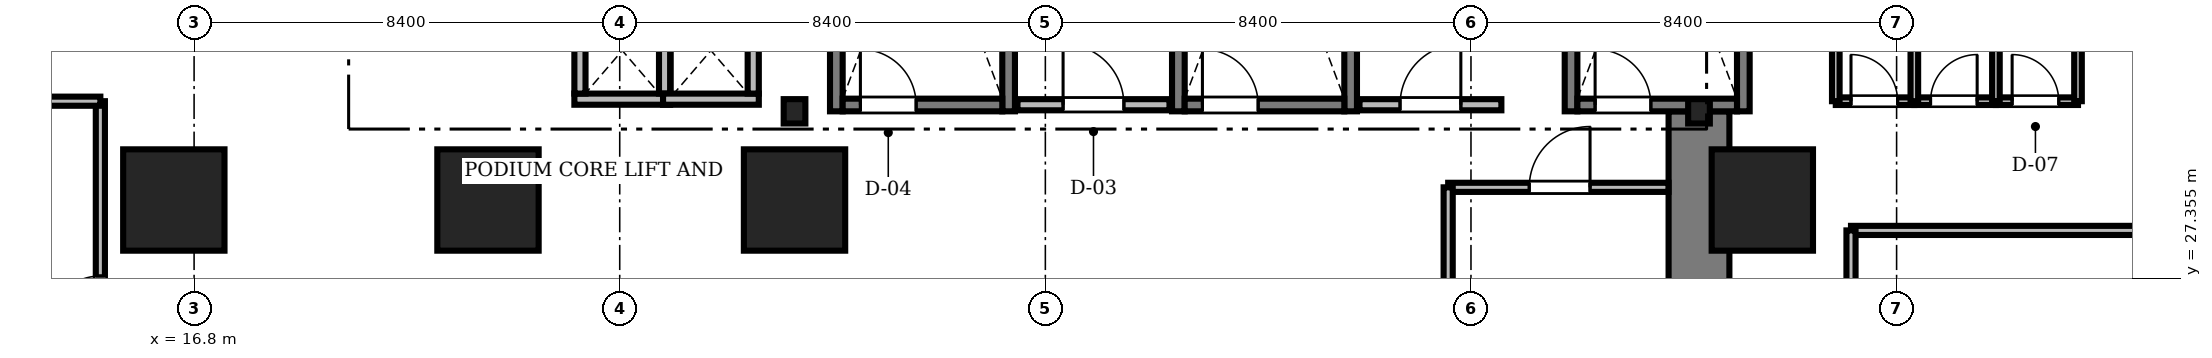
"""IFC4 building model, lengths in metres.
Left out: names, types, materials, properties, quantities, classifications, styles, units other than length and angle.
Written with IfcOpenShell. Run it as: python <this file> out.ifc"""

import sys

from ifc_helpers import new_model, si_unit, direction, frame, frame_2d, origin, origin_2d, place, context, subcontext, project, spatial, rectangle, i_section, extrude, source, transform, mapped, element, fill, save


model = new_model("IFC4")
c1 = context("Model", 3, precision=1e-05, world=origin(), true_north=direction((0.0, 1.0)))
c2 = subcontext(c1, "Body", "Model", "MODEL_VIEW")
j1 = project(units=[si_unit("LENGTHUNIT", "METRE"), si_unit("PLANEANGLEUNIT", "RADIAN")], contexts=[c1])
p1 = place(None, origin())
s1 = spatial("IfcSite", under=j1, at=p1, CompositionType="ELEMENT")
p2 = place(p1, origin())
s2 = spatial("IfcBuilding", under=s1, at=p2, CompositionType="ELEMENT")
p3 = place(p2, frame((0.0, 0.0, 11.4)))
s3 = spatial("IfcBuildingStorey", under=s2, at=p3, CompositionType="ELEMENT", Elevation=11.4)
m1 = source(origin(), c2, "Body", "SweptSolid", [
    extrude(rectangle(XDim=13.15, YDim=1.2, at=frame_2d((6.575, 0.0))), origin(), (0.0, 0.0, 1.0), 5.2),
])
p4 = place(p3, frame((46.5, 17.5, 0.0), z_axis=(0.0, 0.0, 1.0), x_axis=(0.0, 1.0, 0.0)))
e1 = element("IfcWall", 1, at=p4, inside=s3, PredefinedType="SHEAR", context=c2, shape_type="MappedRepresentation", body=[
    mapped(m1, transform((0.0, 0.0, 0.0), scale=1.0)),
])
m2 = source(origin(), c2, "Body", "SweptSolid", [
    extrude(i_section(OverallWidth=0.428, OverallDepth=0.481, WebThickness=0.04, FlangeThickness=0.063, FilletRadius=0.015, at=origin_2d()), origin(), (0.0, 0.0, 1.0), 5.2),
])
for number, where, z_axis, x_axis in (
    (2, (28.65, 30.65, 0.0), (0.0, 0.0, 1.0), (1.0, 0.0, 0.0)),
    (3, (46.5, 30.65, 0.0), (0.0, 0.0, 1.0), (1.0, 0.0, 0.0)),
):
    element("IfcColumn", number, at=place(p3, frame(where, z_axis=z_axis, x_axis=x_axis)), inside=s3, PredefinedType="COLUMN", context=c2, shape_type="MappedRepresentation", body=[
        mapped(m2, transform((0.0, 0.0, 0.0), scale=1.0)),
    ])
m3 = source(origin(), c2, "Body", "SweptSolid", [
    extrude(rectangle(XDim=2.0, YDim=2.0, at=origin_2d()), origin(), (0.0, 0.0, 1.0), 5.2),
])
for number, where, z_axis, x_axis in (
    (4, (16.4, 28.9, 0.0), (0.0, 0.0, 1.0), (1.0, 0.0, 0.0)),
    (5, (22.6, 28.9, 0.0), (0.0, 0.0, 1.0), (1.0, 0.0, 0.0)),
    (6, (28.65, 28.9, 0.0), (0.0, 0.0, 1.0), (1.0, 0.0, 0.0)),
    (7, (47.75, 28.9, 0.0), (0.0, 0.0, 1.0), (1.0, 0.0, 0.0)),
):
    element("IfcColumn", number, at=place(p3, frame(where, z_axis=z_axis, x_axis=x_axis)), inside=s3, PredefinedType="COLUMN", context=c2, shape_type="MappedRepresentation", body=[
        mapped(m3, transform((0.0, 0.0, 0.0), scale=1.0)),
    ])
m4 = source(origin(), c2, "Body", "SweptSolid", [
    extrude(rectangle(XDim=9.05, YDim=0.25, at=frame_2d((4.525, 0.0))), origin(), (0.0, 0.0, 1.0), 5.4),
])
for number, where, z_axis, x_axis in (
    (8, (29.475, 30.65, 0.0), (0.0, 0.0, 1.0), (0.0, 1.0, 0.0)),
    (9, (32.875, 30.65, 0.0), (0.0, 0.0, 1.0), (0.0, 1.0, 0.0)),
):
    element("IfcWall", number, at=place(p3, frame(where, z_axis=z_axis, x_axis=x_axis)), inside=s3, PredefinedType="SOLIDWALL", context=c2, shape_type="MappedRepresentation", body=[
        mapped(m4, transform((0.0, 0.0, 0.0), scale=1.0)),
    ])
m5 = source(origin(), c2, "Body", "SweptSolid", [
    extrude(rectangle(XDim=3.15, YDim=0.25, at=frame_2d((1.575, 0.0))), origin(), (0.0, 0.0, 1.0), 5.4),
])
p5 = place(p3, frame((29.6, 30.775, 0.0), z_axis=(0.0, 0.0, 1.0), x_axis=(1.0, 0.0, 0.0)))
e10 = element("IfcWall", 10, at=p5, inside=s3, PredefinedType="SOLIDWALL", context=c2, shape_type="MappedRepresentation", body=[
    mapped(m5, transform((0.0, 0.0, 0.0), scale=1.0)),
])
m6 = source(origin(), c2, "Body", "SweptSolid", [
    extrude(rectangle(XDim=1.1, YDim=2.2, at=frame_2d((0.55, 1.1))), frame((0.0, 0.135, 0.0), z_axis=(0.0, -1.0, 0.0), x_axis=(1.0, 0.0, 0.0)), (0.0, 0.0, 1.0), 0.27),
])
p6 = place(p5, frame((0.35, 0.0, 0.0)))
e11 = element("IfcOpeningElement", 11, at=p6, cuts=e10, PredefinedType="OPENING", context=c2, shape_type="MappedRepresentation", body=[
    mapped(m6, transform((0.0, 0.0, 0.0), scale=1.0)),
])
for number, where, z_axis, x_axis in (
    (12, (36.225, 30.65, 0.0), (0.0, 0.0, 1.0), (0.0, 1.0, 0.0)),
    (13, (39.625, 30.65, 0.0), (0.0, 0.0, 1.0), (0.0, 1.0, 0.0)),
):
    element("IfcWall", number, at=place(p3, frame(where, z_axis=z_axis, x_axis=x_axis)), inside=s3, PredefinedType="SOLIDWALL", context=c2, shape_type="MappedRepresentation", body=[
        mapped(m4, transform((0.0, 0.0, 0.0), scale=1.0)),
    ])
p7 = place(p3, frame((36.35, 30.775, 0.0), z_axis=(0.0, 0.0, 1.0), x_axis=(1.0, 0.0, 0.0)))
e14 = element("IfcWall", 14, at=p7, inside=s3, PredefinedType="SOLIDWALL", context=c2, shape_type="MappedRepresentation", body=[
    mapped(m5, transform((0.0, 0.0, 0.0), scale=1.0)),
])
p8 = place(p7, frame((0.35, 0.0, 0.0)))
e15 = element("IfcOpeningElement", 15, at=p8, cuts=e14, PredefinedType="OPENING", context=c2, shape_type="MappedRepresentation", body=[
    mapped(m6, transform((0.0, 0.0, 0.0), scale=1.0)),
])
for number, where, z_axis, x_axis in (
    (16, (43.975, 30.65, 0.0), (0.0, 0.0, 1.0), (0.0, 1.0, 0.0)),
    (17, (47.375, 30.65, 0.0), (0.0, 0.0, 1.0), (0.0, 1.0, 0.0)),
):
    element("IfcWall", number, at=place(p3, frame(where, z_axis=z_axis, x_axis=x_axis)), inside=s3, PredefinedType="SOLIDWALL", context=c2, shape_type="MappedRepresentation", body=[
        mapped(m4, transform((0.0, 0.0, 0.0), scale=1.0)),
    ])
p9 = place(p3, frame((44.1, 30.775, 0.0), z_axis=(0.0, 0.0, 1.0), x_axis=(1.0, 0.0, 0.0)))
e18 = element("IfcWall", 18, at=p9, inside=s3, PredefinedType="SOLIDWALL", context=c2, shape_type="MappedRepresentation", body=[
    mapped(m5, transform((0.0, 0.0, 0.0), scale=1.0)),
])
p10 = place(p9, frame((0.35, 0.0, 0.0)))
e19 = element("IfcOpeningElement", 19, at=p10, cuts=e18, PredefinedType="OPENING", context=c2, shape_type="MappedRepresentation", body=[
    mapped(m6, transform((0.0, 0.0, 0.0), scale=1.0)),
])
m7 = source(origin(), c2, "Body", "SweptSolid", [
    extrude(rectangle(XDim=3.0, YDim=0.22, at=frame_2d((1.5, 0.0))), origin(), (0.0, 0.0, 1.0), 5.2),
])
p11 = place(p3, frame((33.05, 30.78, 0.0), z_axis=(0.0, 0.0, 1.0), x_axis=(1.0, 0.0, 0.0)))
e20 = element("IfcWall", 20, at=p11, inside=s3, PredefinedType="SOLIDWALL", context=c2, shape_type="MappedRepresentation", body=[
    mapped(m7, transform((0.0, 0.0, 0.0), scale=1.0)),
])
m8 = source(origin(), c2, "Body", "SweptSolid", [
    extrude(rectangle(XDim=1.2, YDim=2.2, at=frame_2d((0.6, 1.1))), frame((0.0, 0.12, 0.0), z_axis=(0.0, -1.0, 0.0), x_axis=(1.0, 0.0, 0.0)), (0.0, 0.0, 1.0), 0.24),
])
p12 = place(p11, frame((0.9, 0.0, 0.0)))
e21 = element("IfcOpeningElement", 21, at=p12, cuts=e20, PredefinedType="OPENING", context=c2, shape_type="MappedRepresentation", body=[
    mapped(m8, transform((0.0, 0.0, 0.0), scale=1.0)),
])
m9 = source(origin(), c2, "Body", "SweptSolid", [
    extrude(rectangle(XDim=2.8, YDim=0.22, at=frame_2d((1.4, 0.0))), origin(), (0.0, 0.0, 1.0), 5.2),
])
p13 = place(p3, frame((39.8, 30.78, 0.0), z_axis=(0.0, 0.0, 1.0), x_axis=(1.0, 0.0, 0.0)))
e22 = element("IfcWall", 22, at=p13, inside=s3, PredefinedType="SOLIDWALL", context=c2, shape_type="MappedRepresentation", body=[
    mapped(m9, transform((0.0, 0.0, 0.0), scale=1.0)),
])
p14 = place(p13, frame((0.8, 0.0, 0.0)))
e23 = element("IfcOpeningElement", 23, at=p14, cuts=e22, PredefinedType="OPENING", context=c2, shape_type="MappedRepresentation", body=[
    mapped(m8, transform((0.0, 0.0, 0.0), scale=1.0)),
])
m10 = source(origin(), c2, "Body", "SweptSolid", [
    extrude(rectangle(XDim=1.89, YDim=0.22, at=frame_2d((0.945, 0.0))), origin(), (0.0, 0.0, 1.0), 5.2),
])
p15 = place(p3, frame((24.305, 30.89, 0.0), z_axis=(0.0, 0.0, 1.0), x_axis=(1.0, 0.0, 0.0)))
e24 = element("IfcWall", 24, at=p15, inside=s3, PredefinedType="SOLIDWALL", context=c2, shape_type="MappedRepresentation", body=[
    mapped(m10, transform((0.0, 0.0, 0.0), scale=1.0)),
])
m11 = source(origin(), c2, "Body", "SweptSolid", [
    extrude(rectangle(XDim=1.7, YDim=0.22, at=frame_2d((0.85, 0.0))), origin(), (0.0, 0.0, 1.0), 5.2),
])
for number, where, z_axis, x_axis in (
    (25, (24.415, 31.0, 0.0), (0.0, 0.0, 1.0), (0.0, 1.0, 0.0)),
    (26, (26.085, 31.0, 0.0), (0.0, 0.0, 1.0), (0.0, 1.0, 0.0)),
):
    element("IfcWall", number, at=place(p3, frame(where, z_axis=z_axis, x_axis=x_axis)), inside=s3, PredefinedType="SOLIDWALL", context=c2, shape_type="MappedRepresentation", body=[
        mapped(m11, transform((0.0, 0.0, 0.0), scale=1.0)),
    ])
p16 = place(p3, frame((26.055, 30.89, 0.0), z_axis=(0.0, 0.0, 1.0), x_axis=(1.0, 0.0, 0.0)))
e27 = element("IfcWall", 27, at=p16, inside=s3, PredefinedType="SOLIDWALL", context=c2, shape_type="MappedRepresentation", body=[
    mapped(m10, transform((0.0, 0.0, 0.0), scale=1.0)),
])
p17 = place(p3, frame((27.835, 31.0, 0.0), z_axis=(0.0, 0.0, 1.0), x_axis=(0.0, 1.0, 0.0)))
e28 = element("IfcWall", 28, at=p17, inside=s3, PredefinedType="SOLIDWALL", context=c2, shape_type="MappedRepresentation", body=[
    mapped(m11, transform((0.0, 0.0, 0.0), scale=1.0)),
])
m12 = source(origin(), c2, "Body", "SweptSolid", [
    extrude(rectangle(XDim=8.5, YDim=0.18, at=frame_2d((4.25, 0.0))), origin(), (0.0, 0.0, 1.0), 3.392),
])
p18 = place(p3, frame((14.95, 22.35, 0.0), z_axis=(0.0, 0.0, 1.0), x_axis=(0.0, 1.0, 0.0)))
e29 = element("IfcWall", 29, at=p18, inside=s3, PredefinedType="PARTITIONING", context=c2, shape_type="MappedRepresentation", body=[
    mapped(m12, transform((0.0, 0.0, 0.0), scale=1.0)),
])
m13 = source(origin(), c2, "Body", "SweptSolid", [
    extrude(rectangle(XDim=1.05, YDim=2.2, at=frame_2d((0.525, 1.1))), frame((0.0, 0.1, 0.0), z_axis=(0.0, -1.0, 0.0), x_axis=(1.0, 0.0, 0.0)), (0.0, 0.0, 1.0), 0.2),
])
p19 = place(p18, frame((4.0, 0.0, 0.0)))
e30 = element("IfcOpeningElement", 30, at=p19, cuts=e29, PredefinedType="OPENING", context=c2, shape_type="MappedRepresentation", body=[
    mapped(m13, transform((0.0, 0.0, 0.0), scale=1.0)),
])
m14 = source(origin(), c2, "Body", "SweptSolid", [
    extrude(rectangle(XDim=4.348, YDim=0.18, at=frame_2d((2.174, 0.0))), origin(), (0.0, 0.0, 1.0), 5.2),
])
p20 = place(p3, frame((41.55, 29.15, 0.0), z_axis=(0.0, 0.0, 1.0), x_axis=(1.0, 0.0, 0.0)))
e31 = element("IfcWall", 31, at=p20, inside=s3, PredefinedType="PARTITIONING", context=c2, shape_type="MappedRepresentation", body=[
    mapped(m14, transform((0.0, 0.0, 0.0), scale=1.0)),
])
m15 = source(origin(), c2, "Body", "SweptSolid", [
    extrude(rectangle(XDim=1.2, YDim=2.2, at=frame_2d((0.6, 1.1))), frame((0.0, 0.1, 0.0), z_axis=(0.0, -1.0, 0.0), x_axis=(1.0, 0.0, 0.0)), (0.0, 0.0, 1.0), 0.2),
])
p21 = place(p20, frame((1.6, 0.0, 0.0)))
e32 = element("IfcOpeningElement", 32, at=p21, cuts=e31, PredefinedType="OPENING", context=c2, shape_type="MappedRepresentation", body=[
    mapped(m15, transform((0.0, 0.0, 0.0), scale=1.0)),
])
m16 = source(origin(), c2, "Body", "SweptSolid", [
    extrude(rectangle(XDim=1.62, YDim=0.15, at=frame_2d((0.81, 0.0))), origin(), (0.0, 0.0, 1.0), 5.2),
])
p22 = place(p3, frame((52.36, 30.85, 0.0), z_axis=(0.0, 0.0, 1.0), x_axis=(1.0, 0.0, 0.0)))
e33 = element("IfcWall", 33, at=p22, inside=s3, PredefinedType="PARTITIONING", context=c2, shape_type="MappedRepresentation", body=[
    mapped(m16, transform((0.0, 0.0, 0.0), scale=1.0)),
])
m17 = source(origin(), c2, "Body", "SweptSolid", [
    extrude(rectangle(XDim=0.92, YDim=2.1, at=frame_2d((0.46, 1.05))), frame((0.0, 0.085, 0.0), z_axis=(0.0, -1.0, 0.0), x_axis=(1.0, 0.0, 0.0)), (0.0, 0.0, 1.0), 0.17),
])
p23 = place(p22, frame((0.32, 0.0, 0.0)))
e34 = element("IfcOpeningElement", 34, at=p23, cuts=e33, PredefinedType="OPENING", context=c2, shape_type="MappedRepresentation", body=[
    mapped(m17, transform((0.0, 0.0, 0.0), scale=1.0)),
])
m18 = source(origin(), c2, "Body", "SweptSolid", [
    extrude(rectangle(XDim=1.61, YDim=0.15, at=frame_2d((0.805, 0.0))), origin(), (0.0, 0.0, 1.0), 5.2),
])
p24 = place(p3, frame((50.75, 30.85, 0.0), z_axis=(0.0, 0.0, 1.0), x_axis=(1.0, 0.0, 0.0)))
e35 = element("IfcWall", 35, at=p24, inside=s3, PredefinedType="PARTITIONING", context=c2, shape_type="MappedRepresentation", body=[
    mapped(m18, transform((0.0, 0.0, 0.0), scale=1.0)),
])
p25 = place(p24, frame((0.32, 0.0, 0.0)))
e36 = element("IfcOpeningElement", 36, at=p25, cuts=e35, PredefinedType="OPENING", context=c2, shape_type="MappedRepresentation", body=[
    mapped(m17, transform((0.0, 0.0, 0.0), scale=1.0)),
])
m19 = source(origin(), c2, "Body", "SweptSolid", [
    extrude(rectangle(XDim=1.55, YDim=0.15, at=frame_2d((0.775, 0.0))), origin(), (0.0, 0.0, 1.0), 5.2),
])
p26 = place(p3, frame((49.2, 30.85, 0.0), z_axis=(0.0, 0.0, 1.0), x_axis=(1.0, 0.0, 0.0)))
e37 = element("IfcWall", 37, at=p26, inside=s3, PredefinedType="PARTITIONING", context=c2, shape_type="MappedRepresentation", body=[
    mapped(m19, transform((0.0, 0.0, 0.0), scale=1.0)),
])
p27 = place(p26, frame((0.3, 0.0, 0.0)))
e38 = element("IfcOpeningElement", 38, at=p27, cuts=e37, PredefinedType="OPENING", context=c2, shape_type="MappedRepresentation", body=[
    mapped(m17, transform((0.0, 0.0, 0.0), scale=1.0)),
])
m20 = source(origin(), c2, "Body", "SweptSolid", [
    extrude(rectangle(XDim=14.75, YDim=0.18, at=frame_2d((7.375, 0.0))), origin(), (0.0, 0.0, 1.0), 4.592),
])
p28 = place(p3, frame((49.5, 28.3, 0.0), z_axis=(0.0, 0.0, 1.0), x_axis=(1.0, 0.0, 0.0)))
e39 = element("IfcWall", 39, at=p28, inside=s3, PredefinedType="PARTITIONING", context=c2, shape_type="MappedRepresentation", body=[
    mapped(m20, transform((0.0, 0.0, 0.0), scale=1.0)),
])
m21 = source(origin(), c2, "Body", "SweptSolid", [
    extrude(rectangle(XDim=11.75, YDim=0.18, at=frame_2d((5.875, 0.0))), origin(), (0.0, 0.0, 1.0), 4.668),
])
p29 = place(p3, frame((49.5, 16.55, 0.0), z_axis=(0.0, 0.0, 1.0), x_axis=(0.0, 1.0, 0.0)))
e40 = element("IfcWall", 40, at=p29, inside=s3, PredefinedType="PARTITIONING", context=c2, shape_type="MappedRepresentation", body=[
    mapped(m21, transform((0.0, 0.0, 0.0), scale=1.0)),
])
m22 = source(origin(), c2, "Body", "SweptSolid", [
    extrude(rectangle(XDim=11.2, YDim=0.18, at=frame_2d((5.6, 0.0))), origin(), (0.0, 0.0, 1.0), 3.392),
])
p30 = place(p3, frame((3.75, 30.85, 0.0), z_axis=(0.0, 0.0, 1.0), x_axis=(1.0, 0.0, 0.0)))
e41 = element("IfcWall", 41, at=p30, inside=s3, PredefinedType="PARTITIONING", context=c2, shape_type="MappedRepresentation", body=[
    mapped(m22, transform((0.0, 0.0, 0.0), scale=1.0)),
])
m23 = source(origin(), c2, "Body", "SweptSolid", [
    extrude(rectangle(XDim=2.65, YDim=0.15, at=frame_2d((1.325, 0.0))), origin(), (0.0, 0.0, 1.0), 5.2),
])
for number, where, z_axis, x_axis in (
    (42, (49.2, 30.85, 0.0), (0.0, 0.0, 1.0), (0.0, 1.0, 0.0)),
    (43, (50.75, 30.85, 0.0), (0.0, 0.0, 1.0), (0.0, 1.0, 0.0)),
    (44, (52.36, 30.85, 0.0), (0.0, 0.0, 1.0), (0.0, 1.0, 0.0)),
    (45, (53.98, 30.85, 0.0), (0.0, 0.0, 1.0), (0.0, 1.0, 0.0)),
):
    element("IfcWall", number, at=place(p3, frame(where, z_axis=z_axis, x_axis=x_axis)), inside=s3, PredefinedType="PARTITIONING", context=c2, shape_type="MappedRepresentation", body=[
        mapped(m23, transform((0.0, 0.0, 0.0), scale=1.0)),
    ])
m24 = source(origin(), c2, "Body", "SweptSolid", [
    extrude(rectangle(XDim=2.35, YDim=0.18, at=frame_2d((1.175, 0.0))), origin(), (0.0, 0.0, 1.0), 5.2),
])
p31 = place(p3, frame((41.55, 26.8, 0.0), z_axis=(0.0, 0.0, 1.0), x_axis=(0.0, 1.0, 0.0)))
e46 = element("IfcWall", 46, at=p31, inside=s3, PredefinedType="PARTITIONING", context=c2, shape_type="MappedRepresentation", body=[
    mapped(m24, transform((0.0, 0.0, 0.0), scale=1.0)),
])
m25 = source(origin(), c2, "Body", "SweptSolid", [
    extrude(rectangle(XDim=1.1, YDim=2.2, at=frame_2d((0.55, 1.1))), frame((0.0, 0.025, 0.0), z_axis=(0.0, -1.0, 0.0), x_axis=(1.0, 0.0, 0.0)), (0.0, 0.0, 1.0), 0.05),
])
p32 = place(p6, origin())
e47 = element("IfcDoor", 47, at=p32, inside=s3, OperationType="SINGLE_SWING_LEFT", PredefinedType="DOOR", context=c2, shape_type="MappedRepresentation", body=[
    mapped(m25, transform((0.0, 0.0, 0.0), scale=1.0)),
])
fill(e11, e47)
p33 = place(p8, origin())
e48 = element("IfcDoor", 48, at=p33, inside=s3, OperationType="SINGLE_SWING_LEFT", PredefinedType="DOOR", context=c2, shape_type="MappedRepresentation", body=[
    mapped(m25, transform((0.0, 0.0, 0.0), scale=1.0)),
])
fill(e15, e48)
p34 = place(p10, origin())
e49 = element("IfcDoor", 49, at=p34, inside=s3, OperationType="SINGLE_SWING_LEFT", PredefinedType="DOOR", context=c2, shape_type="MappedRepresentation", body=[
    mapped(m25, transform((0.0, 0.0, 0.0), scale=1.0)),
])
fill(e19, e49)
m26 = source(origin(), c2, "Body", "SweptSolid", [
    extrude(rectangle(XDim=1.2, YDim=2.2, at=frame_2d((0.6, 1.1))), frame((0.0, 0.025, 0.0), z_axis=(0.0, -1.0, 0.0), x_axis=(1.0, 0.0, 0.0)), (0.0, 0.0, 1.0), 0.05),
])
p35 = place(p12, origin())
e50 = element("IfcDoor", 50, at=p35, inside=s3, OperationType="SINGLE_SWING_LEFT", PredefinedType="DOOR", context=c2, shape_type="MappedRepresentation", body=[
    mapped(m26, transform((0.0, 0.0, 0.0), scale=1.0)),
])
fill(e21, e50)
p36 = place(p14, origin())
e51 = element("IfcDoor", 51, at=p36, inside=s3, OperationType="SINGLE_SWING_RIGHT", PredefinedType="DOOR", context=c2, shape_type="MappedRepresentation", body=[
    mapped(m26, transform((0.0, 0.0, 0.0), scale=1.0)),
])
fill(e23, e51)
m27 = source(origin(), c2, "Body", "SweptSolid", [
    extrude(rectangle(XDim=1.05, YDim=2.2, at=frame_2d((0.525, 1.1))), frame((0.0, 0.025, 0.0), z_axis=(0.0, -1.0, 0.0), x_axis=(1.0, 0.0, 0.0)), (0.0, 0.0, 1.0), 0.05),
])
p37 = place(p19, origin())
e52 = element("IfcDoor", 52, at=p37, inside=s3, OperationType="SINGLE_SWING_LEFT", PredefinedType="DOOR", context=c2, shape_type="MappedRepresentation", body=[
    mapped(m27, transform((0.0, 0.0, 0.0), scale=1.0)),
])
fill(e30, e52)
p38 = place(p21, origin())
e53 = element("IfcDoor", 53, at=p38, inside=s3, OperationType="SINGLE_SWING_RIGHT", PredefinedType="DOOR", context=c2, shape_type="MappedRepresentation", body=[
    mapped(m26, transform((0.0, 0.0, 0.0), scale=1.0)),
])
fill(e32, e53)
m28 = source(origin(), c2, "Body", "SweptSolid", [
    extrude(rectangle(XDim=0.92, YDim=2.1, at=frame_2d((0.46, 1.05))), frame((0.0, 0.025, 0.0), z_axis=(0.0, -1.0, 0.0), x_axis=(1.0, 0.0, 0.0)), (0.0, 0.0, 1.0), 0.05),
])
p39 = place(p23, origin())
e54 = element("IfcDoor", 54, at=p39, inside=s3, OperationType="SINGLE_SWING_LEFT", PredefinedType="DOOR", context=c2, shape_type="MappedRepresentation", body=[
    mapped(m28, transform((0.0, 0.0, 0.0), scale=1.0)),
])
fill(e34, e54)
p40 = place(p25, origin())
e55 = element("IfcDoor", 55, at=p40, inside=s3, OperationType="SINGLE_SWING_RIGHT", PredefinedType="DOOR", context=c2, shape_type="MappedRepresentation", body=[
    mapped(m28, transform((0.0, 0.0, 0.0), scale=1.0)),
])
fill(e36, e55)
p41 = place(p27, origin())
e56 = element("IfcDoor", 56, at=p41, inside=s3, OperationType="SINGLE_SWING_LEFT", PredefinedType="DOOR", context=c2, shape_type="MappedRepresentation", body=[
    mapped(m28, transform((0.0, 0.0, 0.0), scale=1.0)),
])
fill(e38, e56)
save(model, sys.argv[1])
